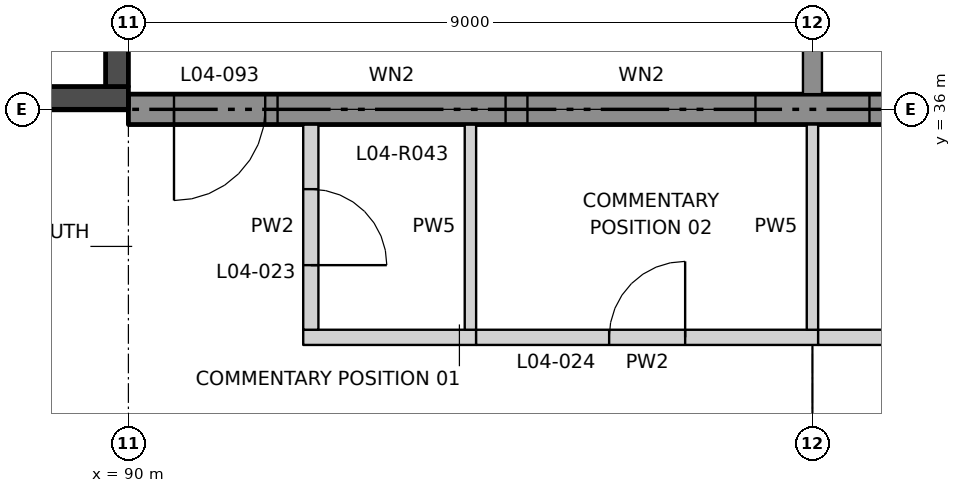
"""IFC4 building model, lengths in metres.
Left out: names, types, materials, properties, quantities, classifications, styles, units other than length and angle.
Written with IfcOpenShell. Run it as: python <this file> out.ifc"""

import sys

from ifc_helpers import new_model, si_unit, direction, frame, frame_2d, origin, place, context, subcontext, project, spatial, rectangle, extrude, element, fill, save


model = new_model("IFC4")
c1 = context("Model", 3, precision=1e-05, world=origin(), true_north=direction((0.0, 1.0)))
c2 = subcontext(c1, "Body", "Model", "MODEL_VIEW")
j1 = project(units=[si_unit("LENGTHUNIT", "METRE"), si_unit("PLANEANGLEUNIT", "RADIAN")], contexts=[c1])
p1 = place(None, origin())
s1 = spatial("IfcSite", under=j1, at=p1, CompositionType="ELEMENT")
p2 = place(p1, origin())
s2 = spatial("IfcBuilding", under=s1, at=p2, CompositionType="ELEMENT")
p3 = place(p2, frame((0.0, 0.0, 28.0)))
s3 = spatial("IfcBuildingStorey", under=s2, at=p3, CompositionType="ELEMENT", Elevation=28.0)
p4 = place(p3, frame((90.0, 36.0, 0.0), z_axis=(0.0, 0.0, 1.0), x_axis=(1.0, 0.0, 0.0)))
e1 = element("IfcWall", 1, at=p4, inside=s3, PredefinedType="SOLIDWALL", context=c2, shape_type="SweptSolid", body=[
    extrude(rectangle(XDim=81.0, YDim=0.4, at=frame_2d((40.5, 0.0))), origin(), (0.0, 0.0, 1.0), 5.5),
])
p5 = place(p4, frame((1.962, 0.0, 0.9)))
e2 = element("IfcOpeningElement", 2, at=p5, cuts=e1, PredefinedType="OPENING", context=c2, shape_type="SweptSolid", body=[
    extrude(rectangle(XDim=3.0, YDim=1.8, at=frame_2d((1.5, 0.9))), frame((0.0, 0.21, 0.0), z_axis=(0.0, -1.0, 0.0), x_axis=(1.0, 0.0, 0.0)), (0.0, 0.0, 1.0), 0.42),
])
p6 = place(p4, frame((5.25, 0.0, 0.9)))
e3 = element("IfcOpeningElement", 3, at=p6, cuts=e1, PredefinedType="OPENING", context=c2, shape_type="SweptSolid", body=[
    extrude(rectangle(XDim=3.0, YDim=1.8, at=frame_2d((1.5, 0.9))), frame((0.0, 0.21, 0.0), z_axis=(0.0, -1.0, 0.0), x_axis=(1.0, 0.0, 0.0)), (0.0, 0.0, 1.0), 0.42),
])
p7 = place(p4, frame((9.75, 0.0, 0.9)))
e4 = element("IfcOpeningElement", 4, at=p7, cuts=e1, PredefinedType="OPENING", context=c2, shape_type="SweptSolid", body=[
    extrude(rectangle(XDim=3.0, YDim=1.8, at=frame_2d((1.5, 0.9))), frame((0.0, 0.21, 0.0), z_axis=(0.0, -1.0, 0.0), x_axis=(1.0, 0.0, 0.0)), (0.0, 0.0, 1.0), 0.42),
])
p8 = place(p4, frame((14.25, 0.0, 0.9)))
e5 = element("IfcOpeningElement", 5, at=p8, cuts=e1, PredefinedType="OPENING", context=c2, shape_type="SweptSolid", body=[
    extrude(rectangle(XDim=3.0, YDim=1.8, at=frame_2d((1.5, 0.9))), frame((0.0, 0.21, 0.0), z_axis=(0.0, -1.0, 0.0), x_axis=(1.0, 0.0, 0.0)), (0.0, 0.0, 1.0), 0.42),
])
p9 = place(p4, frame((18.75, 0.0, 0.9)))
e6 = element("IfcOpeningElement", 6, at=p9, cuts=e1, PredefinedType="OPENING", context=c2, shape_type="SweptSolid", body=[
    extrude(rectangle(XDim=3.0, YDim=1.8, at=frame_2d((1.5, 0.9))), frame((0.0, 0.21, 0.0), z_axis=(0.0, -1.0, 0.0), x_axis=(1.0, 0.0, 0.0)), (0.0, 0.0, 1.0), 0.42),
])
p10 = place(p4, frame((23.25, 0.0, 0.9)))
e7 = element("IfcOpeningElement", 7, at=p10, cuts=e1, PredefinedType="OPENING", context=c2, shape_type="SweptSolid", body=[
    extrude(rectangle(XDim=3.0, YDim=1.8, at=frame_2d((1.5, 0.9))), frame((0.0, 0.21, 0.0), z_axis=(0.0, -1.0, 0.0), x_axis=(1.0, 0.0, 0.0)), (0.0, 0.0, 1.0), 0.42),
])
p11 = place(p4, frame((27.75, 0.0, 0.9)))
e8 = element("IfcOpeningElement", 8, at=p11, cuts=e1, PredefinedType="OPENING", context=c2, shape_type="SweptSolid", body=[
    extrude(rectangle(XDim=3.0, YDim=1.8, at=frame_2d((1.5, 0.9))), frame((0.0, 0.21, 0.0), z_axis=(0.0, -1.0, 0.0), x_axis=(1.0, 0.0, 0.0)), (0.0, 0.0, 1.0), 0.42),
])
p12 = place(p4, frame((32.238, 0.0, 0.9)))
e9 = element("IfcOpeningElement", 9, at=p12, cuts=e1, PredefinedType="OPENING", context=c2, shape_type="SweptSolid", body=[
    extrude(rectangle(XDim=3.0, YDim=1.8, at=frame_2d((1.5, 0.9))), frame((0.0, 0.21, 0.0), z_axis=(0.0, -1.0, 0.0), x_axis=(1.0, 0.0, 0.0)), (0.0, 0.0, 1.0), 0.42),
])
p13 = place(p4, frame((35.262, 0.0, 0.9)))
e10 = element("IfcOpeningElement", 10, at=p13, cuts=e1, PredefinedType="OPENING", context=c2, shape_type="SweptSolid", body=[
    extrude(rectangle(XDim=4.5, YDim=1.8, at=frame_2d((2.25, 0.9))), frame((0.0, 0.21, 0.0), z_axis=(0.0, -1.0, 0.0), x_axis=(1.0, 0.0, 0.0)), (0.0, 0.0, 1.0), 0.42),
])
p14 = place(p4, frame((41.262, 0.0, 0.9)))
e11 = element("IfcOpeningElement", 11, at=p14, cuts=e1, PredefinedType="OPENING", context=c2, shape_type="SweptSolid", body=[
    extrude(rectangle(XDim=4.5, YDim=1.8, at=frame_2d((2.25, 0.9))), frame((0.0, 0.21, 0.0), z_axis=(0.0, -1.0, 0.0), x_axis=(1.0, 0.0, 0.0)), (0.0, 0.0, 1.0), 0.42),
])
p15 = place(p4, frame((47.262, 0.0, 0.9)))
e12 = element("IfcOpeningElement", 12, at=p15, cuts=e1, PredefinedType="OPENING", context=c2, shape_type="SweptSolid", body=[
    extrude(rectangle(XDim=4.5, YDim=1.8, at=frame_2d((2.25, 0.9))), frame((0.0, 0.21, 0.0), z_axis=(0.0, -1.0, 0.0), x_axis=(1.0, 0.0, 0.0)), (0.0, 0.0, 1.0), 0.42),
])
p16 = place(p4, frame((53.262, 0.0, 0.9)))
e13 = element("IfcOpeningElement", 13, at=p16, cuts=e1, PredefinedType="OPENING", context=c2, shape_type="SweptSolid", body=[
    extrude(rectangle(XDim=4.5, YDim=1.8, at=frame_2d((2.25, 0.9))), frame((0.0, 0.21, 0.0), z_axis=(0.0, -1.0, 0.0), x_axis=(1.0, 0.0, 0.0)), (0.0, 0.0, 1.0), 0.42),
])
p17 = place(p4, frame((59.262, 0.0, 0.9)))
e14 = element("IfcOpeningElement", 14, at=p17, cuts=e1, PredefinedType="OPENING", context=c2, shape_type="SweptSolid", body=[
    extrude(rectangle(XDim=4.5, YDim=1.8, at=frame_2d((2.25, 0.9))), frame((0.0, 0.21, 0.0), z_axis=(0.0, -1.0, 0.0), x_axis=(1.0, 0.0, 0.0)), (0.0, 0.0, 1.0), 0.42),
])
p18 = place(p4, frame((75.9, 0.0, 0.0)))
e15 = element("IfcOpeningElement", 15, at=p18, cuts=e1, PredefinedType="OPENING", context=c2, shape_type="SweptSolid", body=[
    extrude(rectangle(XDim=1.2, YDim=2.1, at=frame_2d((0.6, 1.05))), frame((0.0, 0.21, 0.0), z_axis=(0.0, -1.0, 0.0), x_axis=(1.0, 0.0, 0.0)), (0.0, 0.0, 1.0), 0.42),
])
p19 = place(p4, frame((0.6, 0.0, 0.0)))
e16 = element("IfcOpeningElement", 16, at=p19, cuts=e1, PredefinedType="OPENING", context=c2, shape_type="SweptSolid", body=[
    extrude(rectangle(XDim=1.2, YDim=2.1, at=frame_2d((0.6, 1.05))), frame((0.0, 0.21, 0.0), z_axis=(0.0, -1.0, 0.0), x_axis=(1.0, 0.0, 0.0)), (0.0, 0.0, 1.0), 0.42),
])
p20 = place(p3, frame((92.3, 33.0, 0.0), z_axis=(0.0, 0.0, 1.0), x_axis=(1.0, 0.0, 0.0)))
e17 = element("IfcWall", 17, at=p20, inside=s3, PredefinedType="PARTITIONING", context=c2, shape_type="SweptSolid", body=[
    extrude(rectangle(XDim=2.275, YDim=0.2, at=frame_2d((1.137, 0.0))), origin(), (0.0, 0.0, 1.0), 5.5),
])
p21 = place(p3, frame((94.575, 33.0, 0.0), z_axis=(0.0, 0.0, 1.0), x_axis=(1.0, 0.0, 0.0)))
e18 = element("IfcWall", 18, at=p21, inside=s3, PredefinedType="PARTITIONING", context=c2, shape_type="SweptSolid", body=[
    extrude(rectangle(XDim=4.5, YDim=0.2, at=frame_2d((2.25, 0.0))), origin(), (0.0, 0.0, 1.0), 5.5),
])
p22 = place(p21, frame((1.75, 0.0, 0.0)))
e19 = element("IfcOpeningElement", 19, at=p22, cuts=e18, PredefinedType="OPENING", context=c2, shape_type="SweptSolid", body=[
    extrude(rectangle(XDim=1.0, YDim=2.1, at=frame_2d((0.5, 1.05))), frame((0.0, 0.11, 0.0), z_axis=(0.0, -1.0, 0.0), x_axis=(1.0, 0.0, 0.0)), (0.0, 0.0, 1.0), 0.22),
])
p23 = place(p3, frame((99.075, 33.0, 0.0), z_axis=(0.0, 0.0, 1.0), x_axis=(1.0, 0.0, 0.0)))
e20 = element("IfcWall", 20, at=p23, inside=s3, PredefinedType="PARTITIONING", context=c2, shape_type="SweptSolid", body=[
    extrude(rectangle(XDim=4.5, YDim=0.2, at=frame_2d((2.25, 0.0))), origin(), (0.0, 0.0, 1.0), 5.5),
])
p24 = place(p23, frame((1.75, 0.0, 0.0)))
e21 = element("IfcOpeningElement", 21, at=p24, cuts=e20, PredefinedType="OPENING", context=c2, shape_type="SweptSolid", body=[
    extrude(rectangle(XDim=1.0, YDim=2.1, at=frame_2d((0.5, 1.05))), frame((0.0, 0.11, 0.0), z_axis=(0.0, -1.0, 0.0), x_axis=(1.0, 0.0, 0.0)), (0.0, 0.0, 1.0), 0.22),
])
p25 = place(p3, frame((92.4, 33.1, 0.0), z_axis=(0.0, 0.0, 1.0), x_axis=(0.0, 1.0, 0.0)))
e22 = element("IfcWall", 22, at=p25, inside=s3, PredefinedType="PARTITIONING", context=c2, shape_type="SweptSolid", body=[
    extrude(rectangle(XDim=2.7, YDim=0.2, at=frame_2d((1.35, 0.0))), origin(), (0.0, 0.0, 1.0), 5.5),
])
p26 = place(p25, frame((0.85, 0.0, 0.0)))
e23 = element("IfcOpeningElement", 23, at=p26, cuts=e22, PredefinedType="OPENING", context=c2, shape_type="SweptSolid", body=[
    extrude(rectangle(XDim=1.0, YDim=2.1, at=frame_2d((0.5, 1.05))), frame((0.0, 0.11, 0.0), z_axis=(0.0, -1.0, 0.0), x_axis=(1.0, 0.0, 0.0)), (0.0, 0.0, 1.0), 0.22),
])
p27 = place(p3, frame((94.5, 33.1, 0.0), z_axis=(0.0, 0.0, 1.0), x_axis=(0.0, 1.0, 0.0)))
e24 = element("IfcWall", 24, at=p27, inside=s3, PredefinedType="PARTITIONING", context=c2, shape_type="SweptSolid", body=[
    extrude(rectangle(XDim=2.7, YDim=0.15, at=frame_2d((1.35, 0.0))), origin(), (0.0, 0.0, 1.0), 5.5),
])
p28 = place(p3, frame((99.0, 33.1, 0.0), z_axis=(0.0, 0.0, 1.0), x_axis=(0.0, 1.0, 0.0)))
e25 = element("IfcWall", 25, at=p28, inside=s3, PredefinedType="PARTITIONING", context=c2, shape_type="SweptSolid", body=[
    extrude(rectangle(XDim=2.7, YDim=0.15, at=frame_2d((1.35, 0.0))), origin(), (0.0, 0.0, 1.0), 4.2),
])
p29 = place(p3, frame((90.0, 36.15, 0.0), z_axis=(0.0, 0.0, 1.0), x_axis=(-1.0, 0.0, 0.0)))
e26 = element("IfcWall", 26, at=p29, inside=s3, PredefinedType="SHEAR", context=c2, shape_type="SweptSolid", body=[
    extrude(rectangle(XDim=18.0, YDim=0.3, at=frame_2d((9.0, 0.0))), origin(), (0.0, 0.0, 1.0), 5.5),
])
p30 = place(p3, frame((89.85, 44.7, 0.0), z_axis=(0.0, 0.0, 1.0), x_axis=(0.0, -1.0, 0.0)))
e27 = element("IfcWall", 27, at=p30, inside=s3, PredefinedType="SHEAR", context=c2, shape_type="SweptSolid", body=[
    extrude(rectangle(XDim=8.4, YDim=0.3, at=frame_2d((4.2, 0.0))), origin(), (0.0, 0.0, 1.0), 5.5),
])
p31 = place(p3, frame((99.0, 36.2, 0.0), z_axis=(0.0, 0.0, 1.0), x_axis=(0.0, 1.0, 0.0)))
e28 = element("IfcWall", 28, at=p31, inside=s3, PredefinedType="SOLIDWALL", context=c2, shape_type="SweptSolid", body=[
    extrude(rectangle(XDim=8.45, YDim=0.25, at=frame_2d((4.225, 0.0))), origin(), (0.0, 0.0, 1.0), 4.2),
])
p32 = place(p26, frame((1.0, 0.0, 0.0), z_axis=(0.0, 0.0, 1.0), x_axis=(-1.0, 0.0, 0.0)))
e29 = element("IfcDoor", 29, at=p32, inside=s3, OperationType="SINGLE_SWING_RIGHT", PredefinedType="DOOR", context=c2, shape_type="SweptSolid", body=[
    extrude(rectangle(XDim=1.0, YDim=2.1, at=frame_2d((0.5, 1.05))), frame((0.0, 0.025, 0.0), z_axis=(0.0, -1.0, 0.0), x_axis=(1.0, 0.0, 0.0)), (0.0, 0.0, 1.0), 0.05),
])
fill(e23, e29)
p33 = place(p22, origin())
e30 = element("IfcDoor", 30, at=p33, inside=s3, OperationType="SINGLE_SWING_RIGHT", PredefinedType="DOOR", context=c2, shape_type="SweptSolid", body=[
    extrude(rectangle(XDim=1.0, YDim=2.1, at=frame_2d((0.5, 1.05))), frame((0.0, 0.025, 0.0), z_axis=(0.0, -1.0, 0.0), x_axis=(1.0, 0.0, 0.0)), (0.0, 0.0, 1.0), 0.05),
])
fill(e19, e30)
p34 = place(p5, origin())
e31 = element("IfcWindow", 31, at=p34, inside=s3, PartitioningType="SINGLE_PANEL", PredefinedType="WINDOW", context=c2, shape_type="SweptSolid", body=[
    extrude(rectangle(XDim=3.0, YDim=1.8, at=frame_2d((1.5, 0.9))), frame((0.0, 0.03, 0.0), z_axis=(0.0, -1.0, 0.0), x_axis=(1.0, 0.0, 0.0)), (0.0, 0.0, 1.0), 0.06),
])
fill(e2, e31)
p35 = place(p6, origin())
e32 = element("IfcWindow", 32, at=p35, inside=s3, PartitioningType="SINGLE_PANEL", PredefinedType="WINDOW", context=c2, shape_type="SweptSolid", body=[
    extrude(rectangle(XDim=3.0, YDim=1.8, at=frame_2d((1.5, 0.9))), frame((0.0, 0.03, 0.0), z_axis=(0.0, -1.0, 0.0), x_axis=(1.0, 0.0, 0.0)), (0.0, 0.0, 1.0), 0.06),
])
fill(e3, e32)
p36 = place(p7, origin())
e33 = element("IfcWindow", 33, at=p36, inside=s3, PartitioningType="SINGLE_PANEL", PredefinedType="WINDOW", context=c2, shape_type="SweptSolid", body=[
    extrude(rectangle(XDim=3.0, YDim=1.8, at=frame_2d((1.5, 0.9))), frame((0.0, 0.03, 0.0), z_axis=(0.0, -1.0, 0.0), x_axis=(1.0, 0.0, 0.0)), (0.0, 0.0, 1.0), 0.06),
])
fill(e4, e33)
p37 = place(p19, frame((1.2, 0.0, 0.0), z_axis=(0.0, 0.0, 1.0), x_axis=(-1.0, 0.0, 0.0)))
e34 = element("IfcDoor", 34, at=p37, inside=s3, OperationType="SINGLE_SWING_RIGHT", PredefinedType="DOOR", context=c2, shape_type="SweptSolid", body=[
    extrude(rectangle(XDim=1.2, YDim=2.1, at=frame_2d((0.6, 1.05))), frame((0.0, 0.025, 0.0), z_axis=(0.0, -1.0, 0.0), x_axis=(1.0, 0.0, 0.0)), (0.0, 0.0, 1.0), 0.05),
])
fill(e16, e34)
save(model, sys.argv[1])
